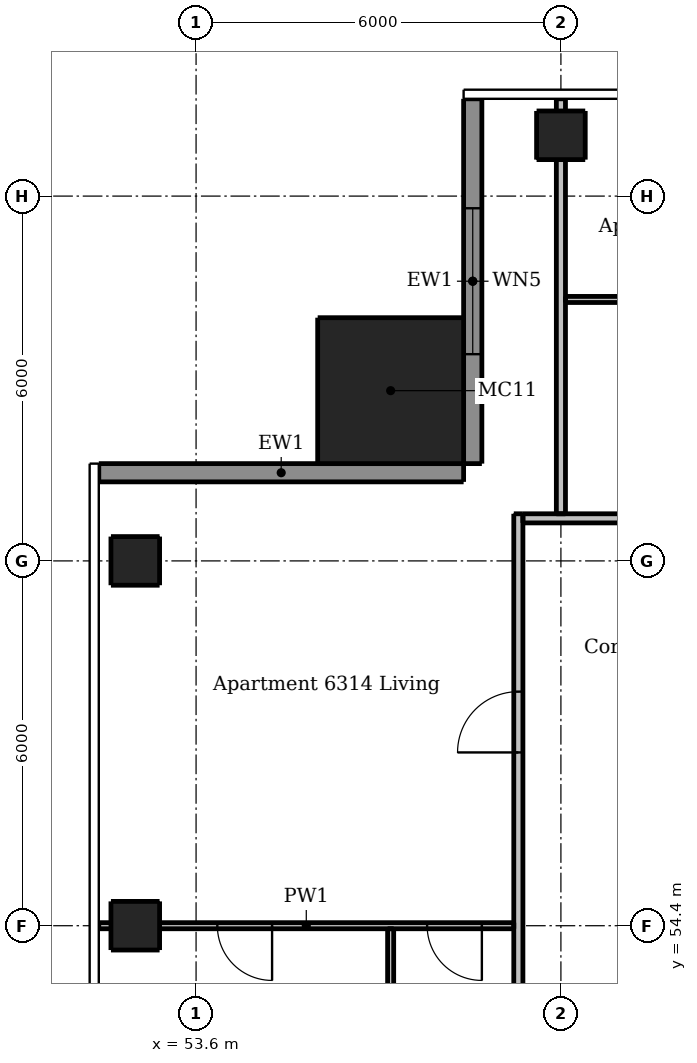
"""IFC4 building model, lengths in metres.
Left out: names, types, materials, properties, quantities, classifications, styles, units other than length and angle.
Written with IfcOpenShell. Run it as: python <this file> out.ifc"""

import sys

from ifc_helpers import new_model, si_unit, direction, frame, frame_2d, origin, origin_2d, place, context, subcontext, project, spatial, rectangle, extrude, element, fill, save


model = new_model("IFC4")
c1 = context("Model", 3, precision=1e-05, world=origin(), true_north=direction((0.0, 1.0)))
c2 = subcontext(c1, "Body", "Model", "MODEL_VIEW")
j1 = project(units=[si_unit("LENGTHUNIT", "METRE"), si_unit("PLANEANGLEUNIT", "RADIAN")], contexts=[c1])
p1 = place(None, origin())
s1 = spatial("IfcSite", under=j1, at=p1, CompositionType="ELEMENT")
p2 = place(p1, origin())
s2 = spatial("IfcBuilding", under=s1, at=p2, CompositionType="ELEMENT")
p3 = place(p2, frame((0.0, 0.0, 238.9)))
s3 = spatial("IfcBuildingStorey", under=s2, at=p3, CompositionType="ELEMENT", Elevation=238.9)
for number, where, z_axis, x_axis in (
    (1, (59.6, 67.4, 0.0), (0.0, 0.0, 1.0), (1.0, 0.0, 0.0)),
    (2, (52.6, 54.4, 0.0), (0.0, 0.0, 1.0), (1.0, 0.0, 0.0)),
    (3, (52.6, 60.4, 0.0), (0.0, 0.0, 1.0), (1.0, 0.0, 0.0)),
):
    element("IfcColumn", number, at=place(p3, frame(where, z_axis=z_axis, x_axis=x_axis)), inside=s3, PredefinedType="COLUMN", context=c2, shape_type="SweptSolid", body=[
        extrude(rectangle(XDim=0.8, YDim=0.8, at=origin_2d()), origin(), (0.0, 0.0, 1.0), 3.05),
    ])
p4 = place(p3, frame((56.8, 63.2, 0.0), z_axis=(0.0, 0.0, 1.0), x_axis=(1.0, 0.0, 0.0)))
e4 = element("IfcColumn", 4, at=p4, inside=s3, PredefinedType="COLUMN", context=c2, shape_type="SweptSolid", body=[
    extrude(rectangle(XDim=2.4, YDim=2.4, at=origin_2d()), origin(), (0.0, 0.0, 1.0), 3.3),
])
p5 = place(p3, frame((58.15, 68.0, 0.0), z_axis=(0.0, 0.0, 1.0), x_axis=(0.0, -1.0, 0.0)))
e5 = element("IfcWall", 5, at=p5, inside=s3, PredefinedType="SOLIDWALL", context=c2, shape_type="SweptSolid", body=[
    extrude(rectangle(XDim=6.0, YDim=0.3, at=frame_2d((3.0, 0.0))), origin(), (0.0, 0.0, 1.0), 3.05),
])
p6 = place(p5, frame((1.8, 0.0, 0.15)))
e6 = element("IfcOpeningElement", 6, at=p6, cuts=e5, PredefinedType="OPENING", context=c2, shape_type="SweptSolid", body=[
    extrude(rectangle(XDim=2.4, YDim=2.1, at=frame_2d((1.2, 1.05))), frame((0.0, 0.16, 0.0), z_axis=(0.0, -1.0, 0.0), x_axis=(1.0, 0.0, 0.0)), (0.0, 0.0, 1.0), 0.32),
])
p7 = place(p3, frame((58.0, 61.85, 0.0), z_axis=(0.0, 0.0, 1.0), x_axis=(-1.0, 0.0, 0.0)))
e7 = element("IfcWall", 7, at=p7, inside=s3, PredefinedType="SOLIDWALL", context=c2, shape_type="SweptSolid", body=[
    extrude(rectangle(XDim=6.0, YDim=0.3, at=frame_2d((3.0, 0.0))), origin(), (0.0, 0.0, 1.0), 3.05),
])
p8 = place(p3, frame((56.8, 54.35, 0.0), z_axis=(0.0, 0.0, 1.0), x_axis=(0.0, -1.0, 0.0)))
e8 = element("IfcWall", 8, at=p8, inside=s3, PredefinedType="PARTITIONING", context=c2, shape_type="SweptSolid", body=[
    extrude(rectangle(XDim=5.875, YDim=0.1, at=frame_2d((2.938, 0.0))), origin(), (0.0, 0.0, 1.0), 3.05),
])
p9 = place(p8, frame((3.75, 0.0, 0.0)))
e9 = element("IfcOpeningElement", 9, at=p9, cuts=e8, PredefinedType="OPENING", context=c2, shape_type="SweptSolid", body=[
    extrude(rectangle(XDim=0.8, YDim=2.1, at=frame_2d((0.4, 1.05))), frame((0.0, 0.06, 0.0), z_axis=(0.0, -1.0, 0.0), x_axis=(1.0, 0.0, 0.0)), (0.0, 0.0, 1.0), 0.12),
])
p10 = place(p3, frame((59.675, 64.7, 0.0), z_axis=(0.0, 0.0, 1.0), x_axis=(1.0, 0.0, 0.0)))
e10 = element("IfcWall", 10, at=p10, inside=s3, PredefinedType="PARTITIONING", context=c2, shape_type="SweptSolid", body=[
    extrude(rectangle(XDim=1.975, YDim=0.1, at=frame_2d((0.987, 0.0))), origin(), (0.0, 0.0, 1.0), 3.05),
])
p11 = place(p3, frame((58.825, 54.4, 0.0), z_axis=(0.0, 0.0, 1.0), x_axis=(-1.0, 0.0, 0.0)))
e11 = element("IfcWall", 11, at=p11, inside=s3, PredefinedType="PARTITIONING", context=c2, shape_type="SweptSolid", body=[
    extrude(rectangle(XDim=6.825, YDim=0.1, at=frame_2d((3.413, 0.0))), origin(), (0.0, 0.0, 1.0), 2.516),
])
p12 = place(p11, frame((0.525, 0.0, 0.0)))
e12 = element("IfcOpeningElement", 12, at=p12, cuts=e11, PredefinedType="OPENING", context=c2, shape_type="SweptSolid", body=[
    extrude(rectangle(XDim=0.9, YDim=2.1, at=frame_2d((0.45, 1.05))), frame((0.0, 0.06, 0.0), z_axis=(0.0, -1.0, 0.0), x_axis=(1.0, 0.0, 0.0)), (0.0, 0.0, 1.0), 0.12),
])
p13 = place(p11, frame((3.975, 0.0, 0.0)))
e13 = element("IfcOpeningElement", 13, at=p13, cuts=e11, PredefinedType="OPENING", context=c2, shape_type="SweptSolid", body=[
    extrude(rectangle(XDim=0.9, YDim=2.1, at=frame_2d((0.45, 1.05))), frame((0.0, 0.06, 0.0), z_axis=(0.0, -1.0, 0.0), x_axis=(1.0, 0.0, 0.0)), (0.0, 0.0, 1.0), 0.12),
])
p14 = place(p3, frame((58.9, 30.325, 0.0), z_axis=(0.0, 0.0, 1.0), x_axis=(0.0, 1.0, 0.0)))
e14 = element("IfcWall", 14, at=p14, inside=s3, PredefinedType="PARTITIONING", context=c2, shape_type="SweptSolid", body=[
    extrude(rectangle(XDim=30.85, YDim=0.15, at=frame_2d((15.425, 0.0))), origin(), (0.0, 0.0, 1.0), 3.05),
])
p15 = place(p14, frame((2.575, 0.0, 0.0)))
e15 = element("IfcOpeningElement", 15, at=p15, cuts=e14, PredefinedType="OPENING", context=c2, shape_type="SweptSolid", body=[
    extrude(rectangle(XDim=1.0, YDim=2.1, at=frame_2d((0.5, 1.05))), frame((0.0, 0.085, 0.0), z_axis=(0.0, -1.0, 0.0), x_axis=(1.0, 0.0, 0.0)), (0.0, 0.0, 1.0), 0.17),
])
p16 = place(p14, frame((8.575, 0.0, 0.0)))
e16 = element("IfcOpeningElement", 16, at=p16, cuts=e14, PredefinedType="OPENING", context=c2, shape_type="SweptSolid", body=[
    extrude(rectangle(XDim=1.0, YDim=2.1, at=frame_2d((0.5, 1.05))), frame((0.0, 0.085, 0.0), z_axis=(0.0, -1.0, 0.0), x_axis=(1.0, 0.0, 0.0)), (0.0, 0.0, 1.0), 0.17),
])
p17 = place(p14, frame((14.575, 0.0, 0.0)))
e17 = element("IfcOpeningElement", 17, at=p17, cuts=e14, PredefinedType="OPENING", context=c2, shape_type="SweptSolid", body=[
    extrude(rectangle(XDim=1.0, YDim=2.1, at=frame_2d((0.5, 1.05))), frame((0.0, 0.085, 0.0), z_axis=(0.0, -1.0, 0.0), x_axis=(1.0, 0.0, 0.0)), (0.0, 0.0, 1.0), 0.17),
])
p18 = place(p14, frame((26.925, 0.0, 0.0)))
e18 = element("IfcOpeningElement", 18, at=p18, cuts=e14, PredefinedType="OPENING", context=c2, shape_type="SweptSolid", body=[
    extrude(rectangle(XDim=1.0, YDim=2.1, at=frame_2d((0.5, 1.05))), frame((0.0, 0.085, 0.0), z_axis=(0.0, -1.0, 0.0), x_axis=(1.0, 0.0, 0.0)), (0.0, 0.0, 1.0), 0.17),
])
p19 = place(p3, frame((59.6, 61.175, 0.0), z_axis=(0.0, 0.0, 1.0), x_axis=(0.0, 1.0, 0.0)))
e19 = element("IfcWall", 19, at=p19, inside=s3, PredefinedType="PARTITIONING", context=c2, shape_type="SweptSolid", body=[
    extrude(rectangle(XDim=6.825, YDim=0.15, at=frame_2d((3.413, 0.0))), origin(), (0.0, 0.0, 1.0), 2.51),
])
p20 = place(p3, frame((58.975, 61.1, 0.0), z_axis=(0.0, 0.0, 1.0), x_axis=(1.0, 0.0, 0.0)))
e20 = element("IfcWall", 20, at=p20, inside=s3, PredefinedType="PARTITIONING", context=c2, shape_type="SweptSolid", body=[
    extrude(rectangle(XDim=29.25, YDim=0.15, at=frame_2d((14.625, 0.0))), origin(), (0.0, 0.0, 1.0), 3.05),
])
p21 = place(p20, frame((3.125, 0.0, 0.0)))
e21 = element("IfcOpeningElement", 21, at=p21, cuts=e20, PredefinedType="OPENING", context=c2, shape_type="SweptSolid", body=[
    extrude(rectangle(XDim=1.0, YDim=2.1, at=frame_2d((0.5, 1.05))), frame((0.0, 0.085, 0.0), z_axis=(0.0, -1.0, 0.0), x_axis=(1.0, 0.0, 0.0)), (0.0, 0.0, 1.0), 0.17),
])
p22 = place(p20, frame((13.925, 0.0, 0.0)))
e22 = element("IfcOpeningElement", 22, at=p22, cuts=e20, PredefinedType="OPENING", context=c2, shape_type="SweptSolid", body=[
    extrude(rectangle(XDim=1.0, YDim=2.1, at=frame_2d((0.5, 1.05))), frame((0.0, 0.085, 0.0), z_axis=(0.0, -1.0, 0.0), x_axis=(1.0, 0.0, 0.0)), (0.0, 0.0, 1.0), 0.17),
])
p23 = place(p20, frame((26.475, 0.0, 0.0)))
e23 = element("IfcOpeningElement", 23, at=p23, cuts=e20, PredefinedType="OPENING", context=c2, shape_type="SweptSolid", body=[
    extrude(rectangle(XDim=1.0, YDim=2.1, at=frame_2d((0.5, 1.05))), frame((0.0, 0.085, 0.0), z_axis=(0.0, -1.0, 0.0), x_axis=(1.0, 0.0, 0.0)), (0.0, 0.0, 1.0), 0.17),
])
p24 = place(p6, origin())
e24 = element("IfcWindow", 24, at=p24, inside=s3, PartitioningType="DOUBLE_PANEL_VERTICAL", PredefinedType="WINDOW", context=c2, shape_type="SweptSolid", body=[
    extrude(rectangle(XDim=2.4, YDim=2.1, at=frame_2d((1.2, 1.05))), frame((0.0, 0.03, 0.0), z_axis=(0.0, -1.0, 0.0), x_axis=(1.0, 0.0, 0.0)), (0.0, 0.0, 1.0), 0.06),
])
fill(e6, e24)
p25 = place(p18, origin())
e25 = element("IfcDoor", 25, at=p25, inside=s3, OperationType="SINGLE_SWING_LEFT", PredefinedType="DOOR", context=c2, shape_type="SweptSolid", body=[
    extrude(rectangle(XDim=1.0, YDim=2.1, at=frame_2d((0.5, 1.05))), frame((0.0, 0.025, 0.0), z_axis=(0.0, -1.0, 0.0), x_axis=(1.0, 0.0, 0.0)), (0.0, 0.0, 1.0), 0.05),
])
fill(e18, e25)
p26 = place(p12, origin())
e26 = element("IfcDoor", 26, at=p26, inside=s3, OperationType="SINGLE_SWING_LEFT", PredefinedType="DOOR", context=c2, shape_type="SweptSolid", body=[
    extrude(rectangle(XDim=0.9, YDim=2.1, at=frame_2d((0.45, 1.05))), frame((0.0, 0.025, 0.0), z_axis=(0.0, -1.0, 0.0), x_axis=(1.0, 0.0, 0.0)), (0.0, 0.0, 1.0), 0.05),
])
fill(e12, e26)
p27 = place(p13, origin())
e27 = element("IfcDoor", 27, at=p27, inside=s3, OperationType="SINGLE_SWING_LEFT", PredefinedType="DOOR", context=c2, shape_type="SweptSolid", body=[
    extrude(rectangle(XDim=0.9, YDim=2.1, at=frame_2d((0.45, 1.05))), frame((0.0, 0.025, 0.0), z_axis=(0.0, -1.0, 0.0), x_axis=(1.0, 0.0, 0.0)), (0.0, 0.0, 1.0), 0.05),
])
fill(e13, e27)
save(model, sys.argv[1])
